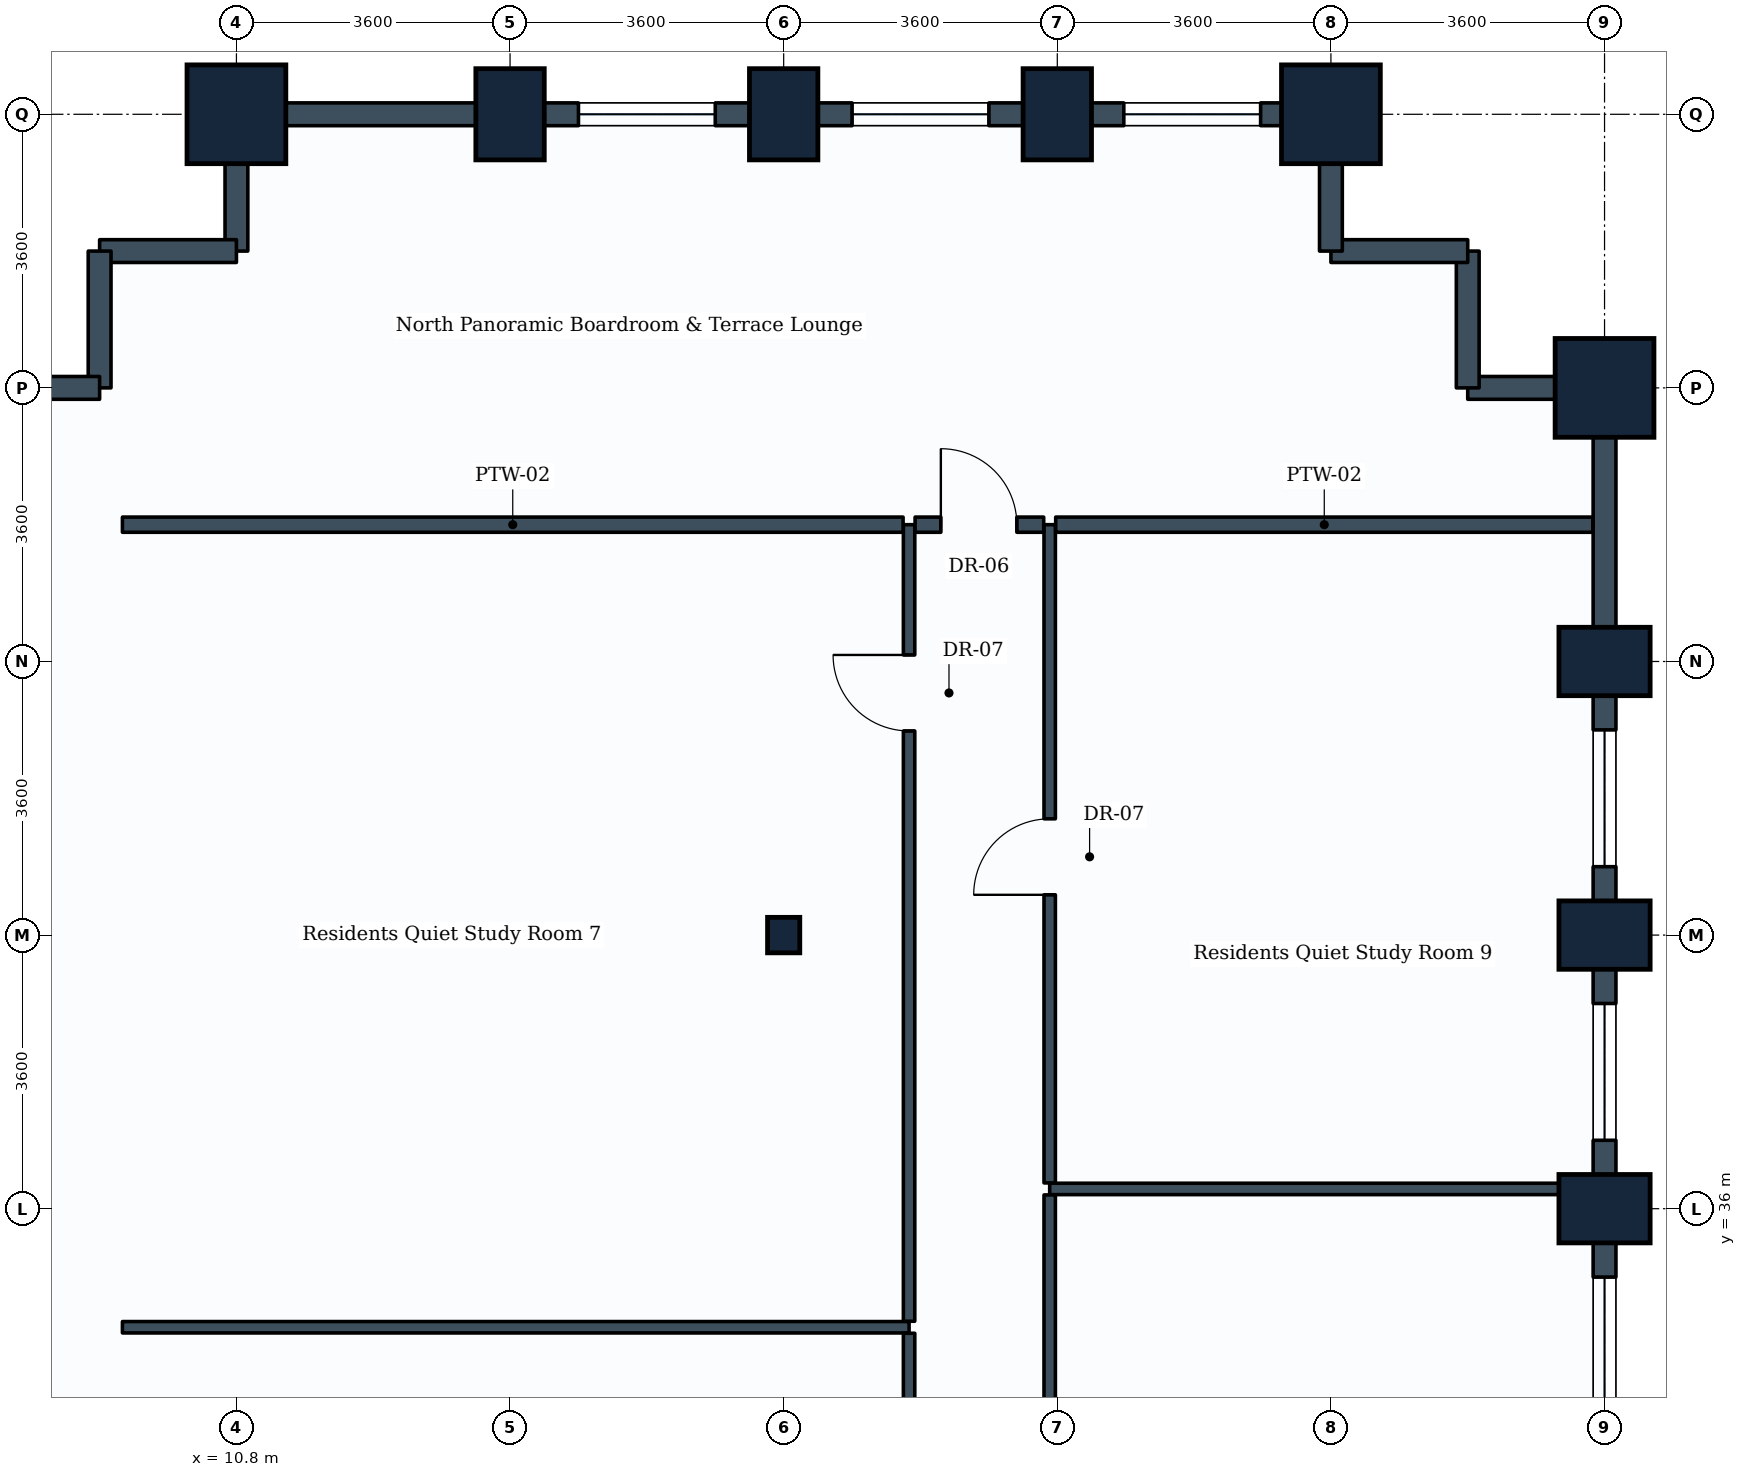
"""IFC4 building model, lengths in metres.
Left out: names, types, materials, properties, quantities, classifications, styles, units other than length and angle.
Written with IfcOpenShell. Run it as: python <this file> out.ifc"""

import sys

from ifc_helpers import new_model, si_unit, direction, frame, frame_2d, origin, origin_2d, place, context, subcontext, project, spatial, rectangle, i_section, extrude, element, fill, save


model = new_model("IFC4")
c1 = context("Model", 3, precision=1e-05, world=origin(), true_north=direction((0.0, 1.0)))
c2 = subcontext(c1, "Body", "Model", "MODEL_VIEW")
j1 = project(units=[si_unit("LENGTHUNIT", "METRE"), si_unit("PLANEANGLEUNIT", "RADIAN")], contexts=[c1])
p1 = place(None, origin())
s1 = spatial("IfcSite", under=j1, at=p1, CompositionType="ELEMENT")
p2 = place(p1, origin())
s2 = spatial("IfcBuilding", under=s1, at=p2, CompositionType="ELEMENT")
p3 = place(p2, frame((0.0, 0.0, 55.2)))
s3 = spatial("IfcBuildingStorey", under=s2, at=p3, CompositionType="ELEMENT", Elevation=55.2)
p4 = place(p3, frame((10.8, 50.4, 0.0), z_axis=(0.0, 0.0, 1.0), x_axis=(1.0, 0.0, 0.0)))
e1 = element("IfcColumn", 1, at=p4, inside=s3, PredefinedType="COLUMN", context=c2, shape_type="SweptSolid", body=[
    extrude(rectangle(XDim=1.3, YDim=1.3, at=origin_2d()), origin(), (0.0, 0.0, 1.0), 3.9),
])
p5 = place(p3, frame((14.4, 50.4, 0.0), z_axis=(0.0, 0.0, 1.0), x_axis=(1.0, 0.0, 0.0)))
e2 = element("IfcColumn", 2, at=p5, inside=s3, PredefinedType="COLUMN", context=c2, shape_type="SweptSolid", body=[
    extrude(rectangle(XDim=0.9, YDim=1.2, at=origin_2d()), origin(), (0.0, 0.0, 1.0), 3.9),
])
p6 = place(p3, frame((18.0, 39.6, 0.0), z_axis=(0.0, 0.0, 1.0), x_axis=(1.0, 0.0, 0.0)))
e3 = element("IfcColumn", 3, at=p6, inside=s3, PredefinedType="COLUMN", context=c2, shape_type="SweptSolid", body=[
    extrude(i_section(OverallWidth=0.424, OverallDepth=0.467, WebThickness=0.033, FlangeThickness=0.053, FilletRadius=0.015, at=origin_2d()), origin(), (0.0, 0.0, 1.0), 3.9),
])
for number, where, z_axis, x_axis in (
    (4, (18.0, 50.4, 0.0), (0.0, 0.0, 1.0), (1.0, 0.0, 0.0)),
    (5, (21.6, 50.4, 0.0), (0.0, 0.0, 1.0), (1.0, 0.0, 0.0)),
):
    element("IfcColumn", number, at=place(p3, frame(where, z_axis=z_axis, x_axis=x_axis)), inside=s3, PredefinedType="COLUMN", context=c2, shape_type="SweptSolid", body=[
        extrude(rectangle(XDim=0.9, YDim=1.2, at=origin_2d()), origin(), (0.0, 0.0, 1.0), 3.9),
    ])
p7 = place(p3, frame((25.2, 50.4, 0.0), z_axis=(0.0, 0.0, 1.0), x_axis=(1.0, 0.0, 0.0)))
e6 = element("IfcColumn", 6, at=p7, inside=s3, PredefinedType="COLUMN", context=c2, shape_type="SweptSolid", body=[
    extrude(rectangle(XDim=1.3, YDim=1.3, at=origin_2d()), origin(), (0.0, 0.0, 1.0), 3.9),
])
for number, where, z_axis, x_axis in (
    (7, (28.8, 36.0, 0.0), (0.0, 0.0, 1.0), (0.0, 1.0, 0.0)),
    (8, (28.8, 39.6, 0.0), (0.0, 0.0, 1.0), (0.0, 1.0, 0.0)),
    (9, (28.8, 43.2, 0.0), (0.0, 0.0, 1.0), (0.0, 1.0, 0.0)),
):
    element("IfcColumn", number, at=place(p3, frame(where, z_axis=z_axis, x_axis=x_axis)), inside=s3, PredefinedType="COLUMN", context=c2, shape_type="SweptSolid", body=[
        extrude(rectangle(XDim=0.9, YDim=1.2, at=origin_2d()), origin(), (0.0, 0.0, 1.0), 3.9),
    ])
p8 = place(p3, frame((28.8, 46.8, 0.0), z_axis=(0.0, 0.0, 1.0), x_axis=(0.0, 1.0, 0.0)))
e10 = element("IfcColumn", 10, at=p8, inside=s3, PredefinedType="COLUMN", context=c2, shape_type="SweptSolid", body=[
    extrude(rectangle(XDim=1.3, YDim=1.3, at=origin_2d()), origin(), (0.0, 0.0, 1.0), 3.9),
])
p9 = place(p3, frame((28.8, 32.4, 0.0), z_axis=(0.0, 0.0, 1.0), x_axis=(0.0, 1.0, 0.0)))
e11 = element("IfcWall", 11, at=p9, inside=s3, PredefinedType="STANDARD", context=c2, shape_type="SweptSolid", body=[
    extrude(rectangle(XDim=3.6, YDim=0.3, at=frame_2d((1.8, 0.0))), origin(), (0.0, 0.0, 1.0), 2.93),
])
p10 = place(p9, frame((0.9, 0.0, 0.85)))
e12 = element("IfcOpeningElement", 12, at=p10, cuts=e11, PredefinedType="OPENING", context=c2, shape_type="SweptSolid", body=[
    extrude(rectangle(XDim=1.8, YDim=1.35, at=frame_2d((0.9, 0.675))), frame((0.0, 0.16, 0.0), z_axis=(0.0, -1.0, 0.0), x_axis=(1.0, 0.0, 0.0)), (0.0, 0.0, 1.0), 0.32),
])
p11 = place(p3, frame((28.8, 36.0, 0.0), z_axis=(0.0, 0.0, 1.0), x_axis=(0.0, 1.0, 0.0)))
e13 = element("IfcWall", 13, at=p11, inside=s3, PredefinedType="STANDARD", context=c2, shape_type="SweptSolid", body=[
    extrude(rectangle(XDim=3.6, YDim=0.3, at=frame_2d((1.8, 0.0))), origin(), (0.0, 0.0, 1.0), 2.93),
])
p12 = place(p11, frame((0.9, 0.0, 0.85)))
e14 = element("IfcOpeningElement", 14, at=p12, cuts=e13, PredefinedType="OPENING", context=c2, shape_type="SweptSolid", body=[
    extrude(rectangle(XDim=1.8, YDim=1.35, at=frame_2d((0.9, 0.675))), frame((0.0, 0.16, 0.0), z_axis=(0.0, -1.0, 0.0), x_axis=(1.0, 0.0, 0.0)), (0.0, 0.0, 1.0), 0.32),
])
p13 = place(p3, frame((28.8, 39.6, 0.0), z_axis=(0.0, 0.0, 1.0), x_axis=(0.0, 1.0, 0.0)))
e15 = element("IfcWall", 15, at=p13, inside=s3, PredefinedType="STANDARD", context=c2, shape_type="SweptSolid", body=[
    extrude(rectangle(XDim=3.6, YDim=0.3, at=frame_2d((1.8, 0.0))), origin(), (0.0, 0.0, 1.0), 2.93),
])
p14 = place(p13, frame((0.9, 0.0, 0.85)))
e16 = element("IfcOpeningElement", 16, at=p14, cuts=e15, PredefinedType="OPENING", context=c2, shape_type="SweptSolid", body=[
    extrude(rectangle(XDim=1.8, YDim=1.35, at=frame_2d((0.9, 0.675))), frame((0.0, 0.16, 0.0), z_axis=(0.0, -1.0, 0.0), x_axis=(1.0, 0.0, 0.0)), (0.0, 0.0, 1.0), 0.32),
])
p15 = place(p3, frame((28.8, 43.2, 0.0), z_axis=(0.0, 0.0, 1.0), x_axis=(0.0, 1.0, 0.0)))
e17 = element("IfcWall", 17, at=p15, inside=s3, PredefinedType="STANDARD", context=c2, shape_type="SweptSolid", body=[
    extrude(rectangle(XDim=3.6, YDim=0.3, at=frame_2d((1.8, 0.0))), origin(), (0.0, 0.0, 1.0), 2.93),
])
p16 = place(p3, frame((27.0, 46.8, 0.0), z_axis=(0.0, 0.0, 1.0), x_axis=(1.0, 0.0, 0.0)))
e18 = element("IfcWall", 18, at=p16, inside=s3, PredefinedType="STANDARD", context=c2, shape_type="SweptSolid", body=[
    extrude(rectangle(XDim=1.8, YDim=0.3, at=frame_2d((0.9, 0.0))), origin(), (0.0, 0.0, 1.0), 2.93),
])
for number, where, z_axis, x_axis in (
    (19, (27.0, 46.8, 0.0), (0.0, 0.0, 1.0), (0.0, 1.0, 0.0)),
    (20, (25.2, 48.6, 0.0), (0.0, 0.0, 1.0), (1.0, 0.0, 0.0)),
):
    element("IfcWall", number, at=place(p3, frame(where, z_axis=z_axis, x_axis=x_axis)), inside=s3, PredefinedType="STANDARD", context=c2, shape_type="SweptSolid", body=[
        extrude(rectangle(XDim=1.8, YDim=0.3, at=frame_2d((0.9, 0.0))), origin(), (0.0, 0.0, 1.0), 3.635),
    ])
p17 = place(p3, frame((25.2, 48.6, 0.0), z_axis=(0.0, 0.0, 1.0), x_axis=(0.0, 1.0, 0.0)))
e21 = element("IfcWall", 21, at=p17, inside=s3, PredefinedType="STANDARD", context=c2, shape_type="SweptSolid", body=[
    extrude(rectangle(XDim=1.8, YDim=0.3, at=frame_2d((0.9, 0.0))), origin(), (0.0, 0.0, 1.0), 2.93),
])
p18 = place(p3, frame((21.6, 50.4, 0.0), z_axis=(0.0, 0.0, 1.0), x_axis=(1.0, 0.0, 0.0)))
e22 = element("IfcWall", 22, at=p18, inside=s3, PredefinedType="STANDARD", context=c2, shape_type="SweptSolid", body=[
    extrude(rectangle(XDim=3.6, YDim=0.3, at=frame_2d((1.8, 0.0))), origin(), (0.0, 0.0, 1.0), 2.93),
])
p19 = place(p18, frame((0.875, 0.0, 0.85)))
e23 = element("IfcOpeningElement", 23, at=p19, cuts=e22, PredefinedType="OPENING", context=c2, shape_type="SweptSolid", body=[
    extrude(rectangle(XDim=1.8, YDim=1.35, at=frame_2d((0.9, 0.675))), frame((0.0, 0.16, 0.0), z_axis=(0.0, -1.0, 0.0), x_axis=(1.0, 0.0, 0.0)), (0.0, 0.0, 1.0), 0.32),
])
p20 = place(p3, frame((18.0, 50.4, 0.0), z_axis=(0.0, 0.0, 1.0), x_axis=(1.0, 0.0, 0.0)))
e24 = element("IfcWall", 24, at=p20, inside=s3, PredefinedType="STANDARD", context=c2, shape_type="SweptSolid", body=[
    extrude(rectangle(XDim=3.6, YDim=0.3, at=frame_2d((1.8, 0.0))), origin(), (0.0, 0.0, 1.0), 2.93),
])
p21 = place(p20, frame((0.9, 0.0, 0.85)))
e25 = element("IfcOpeningElement", 25, at=p21, cuts=e24, PredefinedType="OPENING", context=c2, shape_type="SweptSolid", body=[
    extrude(rectangle(XDim=1.8, YDim=1.35, at=frame_2d((0.9, 0.675))), frame((0.0, 0.16, 0.0), z_axis=(0.0, -1.0, 0.0), x_axis=(1.0, 0.0, 0.0)), (0.0, 0.0, 1.0), 0.32),
])
p22 = place(p3, frame((14.4, 50.4, 0.0), z_axis=(0.0, 0.0, 1.0), x_axis=(1.0, 0.0, 0.0)))
e26 = element("IfcWall", 26, at=p22, inside=s3, PredefinedType="STANDARD", context=c2, shape_type="SweptSolid", body=[
    extrude(rectangle(XDim=3.6, YDim=0.3, at=frame_2d((1.8, 0.0))), origin(), (0.0, 0.0, 1.0), 2.93),
])
p23 = place(p22, frame((0.9, 0.0, 0.85)))
e27 = element("IfcOpeningElement", 27, at=p23, cuts=e26, PredefinedType="OPENING", context=c2, shape_type="SweptSolid", body=[
    extrude(rectangle(XDim=1.8, YDim=1.35, at=frame_2d((0.9, 0.675))), frame((0.0, 0.16, 0.0), z_axis=(0.0, -1.0, 0.0), x_axis=(1.0, 0.0, 0.0)), (0.0, 0.0, 1.0), 0.32),
])
p24 = place(p3, frame((10.8, 50.4, 0.0), z_axis=(0.0, 0.0, 1.0), x_axis=(1.0, 0.0, 0.0)))
e28 = element("IfcWall", 28, at=p24, inside=s3, PredefinedType="STANDARD", context=c2, shape_type="SweptSolid", body=[
    extrude(rectangle(XDim=3.6, YDim=0.3, at=frame_2d((1.8, 0.0))), origin(), (0.0, 0.0, 1.0), 2.93),
])
p25 = place(p3, frame((10.8, 48.6, 0.0), z_axis=(0.0, 0.0, 1.0), x_axis=(0.0, 1.0, 0.0)))
e29 = element("IfcWall", 29, at=p25, inside=s3, PredefinedType="STANDARD", context=c2, shape_type="SweptSolid", body=[
    extrude(rectangle(XDim=1.8, YDim=0.3, at=frame_2d((0.9, 0.0))), origin(), (0.0, 0.0, 1.0), 2.93),
])
for number, where, z_axis, x_axis in (
    (30, (9.0, 48.6, 0.0), (0.0, 0.0, 1.0), (1.0, 0.0, 0.0)),
    (31, (9.0, 46.8, 0.0), (0.0, 0.0, 1.0), (0.0, 1.0, 0.0)),
):
    element("IfcWall", number, at=place(p3, frame(where, z_axis=z_axis, x_axis=x_axis)), inside=s3, PredefinedType="STANDARD", context=c2, shape_type="SweptSolid", body=[
        extrude(rectangle(XDim=1.8, YDim=0.3, at=frame_2d((0.9, 0.0))), origin(), (0.0, 0.0, 1.0), 3.635),
    ])
p26 = place(p3, frame((7.2, 46.8, 0.0), z_axis=(0.0, 0.0, 1.0), x_axis=(1.0, 0.0, 0.0)))
e32 = element("IfcWall", 32, at=p26, inside=s3, PredefinedType="STANDARD", context=c2, shape_type="SweptSolid", body=[
    extrude(rectangle(XDim=1.8, YDim=0.3, at=frame_2d((0.9, 0.0))), origin(), (0.0, 0.0, 1.0), 2.93),
])
p27 = place(p3, frame((9.3, 34.44, 0.0), z_axis=(0.0, 0.0, 1.0), x_axis=(1.0, 0.0, 0.0)))
e33 = element("IfcWall", 33, at=p27, inside=s3, PredefinedType="PARTITIONING", context=c2, shape_type="SweptSolid", body=[
    extrude(rectangle(XDim=10.35, YDim=0.15, at=frame_2d((5.175, 0.0))), origin(), (0.0, 0.0, 1.0), 3.03),
])
p28 = place(p3, frame((19.65, 26.879, 0.0), z_axis=(0.0, 0.0, 1.0), x_axis=(0.0, 1.0, 0.0)))
e34 = element("IfcWall", 34, at=p28, inside=s3, PredefinedType="PARTITIONING", context=c2, shape_type="SweptSolid", body=[
    extrude(rectangle(XDim=7.482, YDim=0.15, at=frame_2d((3.741, 0.0))), origin(), (0.0, 0.0, 1.0), 3.08),
])
p29 = place(p28, frame((1.801, 0.0, 0.0)))
e35 = element("IfcOpeningElement", 35, at=p29, cuts=e34, PredefinedType="OPENING", context=c2, shape_type="SweptSolid", body=[
    extrude(rectangle(XDim=1.0, YDim=2.1, at=frame_2d((0.5, 1.05))), frame((0.0, 0.085, 0.0), z_axis=(0.0, -1.0, 0.0), x_axis=(1.0, 0.0, 0.0)), (0.0, 0.0, 1.0), 0.17),
])
p30 = place(p3, frame((19.65, 34.519, 0.0), z_axis=(0.0, 0.0, 1.0), x_axis=(0.0, 1.0, 0.0)))
e36 = element("IfcWall", 36, at=p30, inside=s3, PredefinedType="PARTITIONING", context=c2, shape_type="SweptSolid", body=[
    extrude(rectangle(XDim=10.481, YDim=0.15, at=frame_2d((5.24, 0.0))), origin(), (0.0, 0.0, 1.0), 3.08),
])
p31 = place(p30, frame((7.767, 0.0, 0.0)))
e37 = element("IfcOpeningElement", 37, at=p31, cuts=e36, PredefinedType="OPENING", context=c2, shape_type="SweptSolid", body=[
    extrude(rectangle(XDim=1.0, YDim=2.1, at=frame_2d((0.5, 1.05))), frame((0.0, 0.085, 0.0), z_axis=(0.0, -1.0, 0.0), x_axis=(1.0, 0.0, 0.0)), (0.0, 0.0, 1.0), 0.17),
])
p32 = place(p3, frame((21.5, 36.26, 0.0), z_axis=(0.0, 0.0, 1.0), x_axis=(1.0, 0.0, 0.0)))
e38 = element("IfcWall", 38, at=p32, inside=s3, PredefinedType="PARTITIONING", context=c2, shape_type="SweptSolid", body=[
    extrude(rectangle(XDim=7.146, YDim=0.15, at=frame_2d((3.573, 0.0))), origin(), (0.0, 0.0, 1.0), 2.93),
])
p33 = place(p3, frame((21.5, 26.879, 0.0), z_axis=(0.0, 0.0, 1.0), x_axis=(0.0, 1.0, 0.0)))
e39 = element("IfcWall", 39, at=p33, inside=s3, PredefinedType="PARTITIONING", context=c2, shape_type="SweptSolid", body=[
    extrude(rectangle(XDim=9.302, YDim=0.15, at=frame_2d((4.651, 0.0))), origin(), (0.0, 0.0, 1.0), 3.08),
])
p34 = place(p33, frame((4.111, 0.0, 0.0)))
e40 = element("IfcOpeningElement", 40, at=p34, cuts=e39, PredefinedType="OPENING", context=c2, shape_type="SweptSolid", body=[
    extrude(rectangle(XDim=1.0, YDim=2.1, at=frame_2d((0.5, 1.05))), frame((0.0, 0.085, 0.0), z_axis=(0.0, -1.0, 0.0), x_axis=(1.0, 0.0, 0.0)), (0.0, 0.0, 1.0), 0.17),
])
p35 = place(p3, frame((21.5, 36.339, 0.0), z_axis=(0.0, 0.0, 1.0), x_axis=(0.0, 1.0, 0.0)))
e41 = element("IfcWall", 41, at=p35, inside=s3, PredefinedType="PARTITIONING", context=c2, shape_type="SweptSolid", body=[
    extrude(rectangle(XDim=8.661, YDim=0.15, at=frame_2d((4.331, 0.0))), origin(), (0.0, 0.0, 1.0), 3.03),
])
p36 = place(p35, frame((3.791, 0.0, 0.0)))
e42 = element("IfcOpeningElement", 42, at=p36, cuts=e41, PredefinedType="OPENING", context=c2, shape_type="SweptSolid", body=[
    extrude(rectangle(XDim=1.0, YDim=2.1, at=frame_2d((0.5, 1.05))), frame((0.0, 0.085, 0.0), z_axis=(0.0, -1.0, 0.0), x_axis=(1.0, 0.0, 0.0)), (0.0, 0.0, 1.0), 0.17),
])
p37 = place(p3, frame((9.3, 45.0, 0.0), z_axis=(0.0, 0.0, 1.0), x_axis=(1.0, 0.0, 0.0)))
e43 = element("IfcWall", 43, at=p37, inside=s3, PredefinedType="PARTITIONING", context=c2, shape_type="SweptSolid", body=[
    extrude(rectangle(XDim=10.271, YDim=0.2, at=frame_2d((5.135, 0.0))), origin(), (0.0, 0.0, 1.0), 3.08),
])
p38 = place(p3, frame((21.579, 45.0, 0.0), z_axis=(0.0, 0.0, 1.0), x_axis=(1.0, 0.0, 0.0)))
e44 = element("IfcWall", 44, at=p38, inside=s3, PredefinedType="PARTITIONING", context=c2, shape_type="SweptSolid", body=[
    extrude(rectangle(XDim=7.067, YDim=0.2, at=frame_2d((3.533, 0.0))), origin(), (0.0, 0.0, 1.0), 2.93),
])
p39 = place(p3, frame((19.729, 45.0, 0.0), z_axis=(0.0, 0.0, 1.0), x_axis=(1.0, 0.0, 0.0)))
e45 = element("IfcWall", 45, at=p39, inside=s3, PredefinedType="PARTITIONING", context=c2, shape_type="SweptSolid", body=[
    extrude(rectangle(XDim=1.692, YDim=0.2, at=frame_2d((0.846, 0.0))), origin(), (0.0, 0.0, 1.0), 3.635),
])
p40 = place(p39, frame((0.339, 0.0, 0.0)))
e46 = element("IfcOpeningElement", 46, at=p40, cuts=e45, PredefinedType="OPENING", context=c2, shape_type="SweptSolid", body=[
    extrude(rectangle(XDim=1.0, YDim=2.1, at=frame_2d((0.5, 1.05))), frame((0.0, 0.11, 0.0), z_axis=(0.0, -1.0, 0.0), x_axis=(1.0, 0.0, 0.0)), (0.0, 0.0, 1.0), 0.22),
])
p41 = place(p10, origin())
e47 = element("IfcWindow", 47, at=p41, inside=s3, PartitioningType="SINGLE_PANEL", PredefinedType="WINDOW", context=c2, shape_type="SweptSolid", body=[
    extrude(rectangle(XDim=1.8, YDim=1.35, at=frame_2d((0.9, 0.675))), frame((0.0, 0.03, 0.0), z_axis=(0.0, -1.0, 0.0), x_axis=(1.0, 0.0, 0.0)), (0.0, 0.0, 1.0), 0.06),
])
fill(e12, e47)
p42 = place(p12, origin())
e48 = element("IfcWindow", 48, at=p42, inside=s3, PartitioningType="SINGLE_PANEL", PredefinedType="WINDOW", context=c2, shape_type="SweptSolid", body=[
    extrude(rectangle(XDim=1.8, YDim=1.35, at=frame_2d((0.9, 0.675))), frame((0.0, 0.03, 0.0), z_axis=(0.0, -1.0, 0.0), x_axis=(1.0, 0.0, 0.0)), (0.0, 0.0, 1.0), 0.06),
])
fill(e14, e48)
p43 = place(p14, origin())
e49 = element("IfcWindow", 49, at=p43, inside=s3, PartitioningType="SINGLE_PANEL", PredefinedType="WINDOW", context=c2, shape_type="SweptSolid", body=[
    extrude(rectangle(XDim=1.8, YDim=1.35, at=frame_2d((0.9, 0.675))), frame((0.0, 0.03, 0.0), z_axis=(0.0, -1.0, 0.0), x_axis=(1.0, 0.0, 0.0)), (0.0, 0.0, 1.0), 0.06),
])
fill(e16, e49)
p44 = place(p19, origin())
e50 = element("IfcWindow", 50, at=p44, inside=s3, PartitioningType="SINGLE_PANEL", PredefinedType="WINDOW", context=c2, shape_type="SweptSolid", body=[
    extrude(rectangle(XDim=1.8, YDim=1.35, at=frame_2d((0.9, 0.675))), frame((0.0, 0.03, 0.0), z_axis=(0.0, -1.0, 0.0), x_axis=(1.0, 0.0, 0.0)), (0.0, 0.0, 1.0), 0.06),
])
fill(e23, e50)
p45 = place(p21, origin())
e51 = element("IfcWindow", 51, at=p45, inside=s3, PartitioningType="SINGLE_PANEL", PredefinedType="WINDOW", context=c2, shape_type="SweptSolid", body=[
    extrude(rectangle(XDim=1.8, YDim=1.35, at=frame_2d((0.9, 0.675))), frame((0.0, 0.03, 0.0), z_axis=(0.0, -1.0, 0.0), x_axis=(1.0, 0.0, 0.0)), (0.0, 0.0, 1.0), 0.06),
])
fill(e25, e51)
p46 = place(p23, origin())
e52 = element("IfcWindow", 52, at=p46, inside=s3, PartitioningType="SINGLE_PANEL", PredefinedType="WINDOW", context=c2, shape_type="SweptSolid", body=[
    extrude(rectangle(XDim=1.8, YDim=1.35, at=frame_2d((0.9, 0.675))), frame((0.0, 0.03, 0.0), z_axis=(0.0, -1.0, 0.0), x_axis=(1.0, 0.0, 0.0)), (0.0, 0.0, 1.0), 0.06),
])
fill(e27, e52)
p47 = place(p31, origin())
e53 = element("IfcDoor", 53, at=p47, inside=s3, OperationType="SINGLE_SWING_RIGHT", PredefinedType="DOOR", context=c2, shape_type="SweptSolid", body=[
    extrude(rectangle(XDim=1.0, YDim=2.1, at=frame_2d((0.5, 1.05))), frame((0.0, 0.025, 0.0), z_axis=(0.0, -1.0, 0.0), x_axis=(1.0, 0.0, 0.0)), (0.0, 0.0, 1.0), 0.05),
])
fill(e37, e53)
p48 = place(p36, origin())
e54 = element("IfcDoor", 54, at=p48, inside=s3, OperationType="SINGLE_SWING_LEFT", PredefinedType="DOOR", context=c2, shape_type="SweptSolid", body=[
    extrude(rectangle(XDim=1.0, YDim=2.1, at=frame_2d((0.5, 1.05))), frame((0.0, 0.025, 0.0), z_axis=(0.0, -1.0, 0.0), x_axis=(1.0, 0.0, 0.0)), (0.0, 0.0, 1.0), 0.05),
])
fill(e42, e54)
p49 = place(p40, origin())
e55 = element("IfcDoor", 55, at=p49, inside=s3, OperationType="SINGLE_SWING_LEFT", PredefinedType="DOOR", context=c2, shape_type="SweptSolid", body=[
    extrude(rectangle(XDim=1.0, YDim=2.1, at=frame_2d((0.5, 1.05))), frame((0.0, 0.025, 0.0), z_axis=(0.0, -1.0, 0.0), x_axis=(1.0, 0.0, 0.0)), (0.0, 0.0, 1.0), 0.05),
])
fill(e46, e55)
save(model, sys.argv[1])
